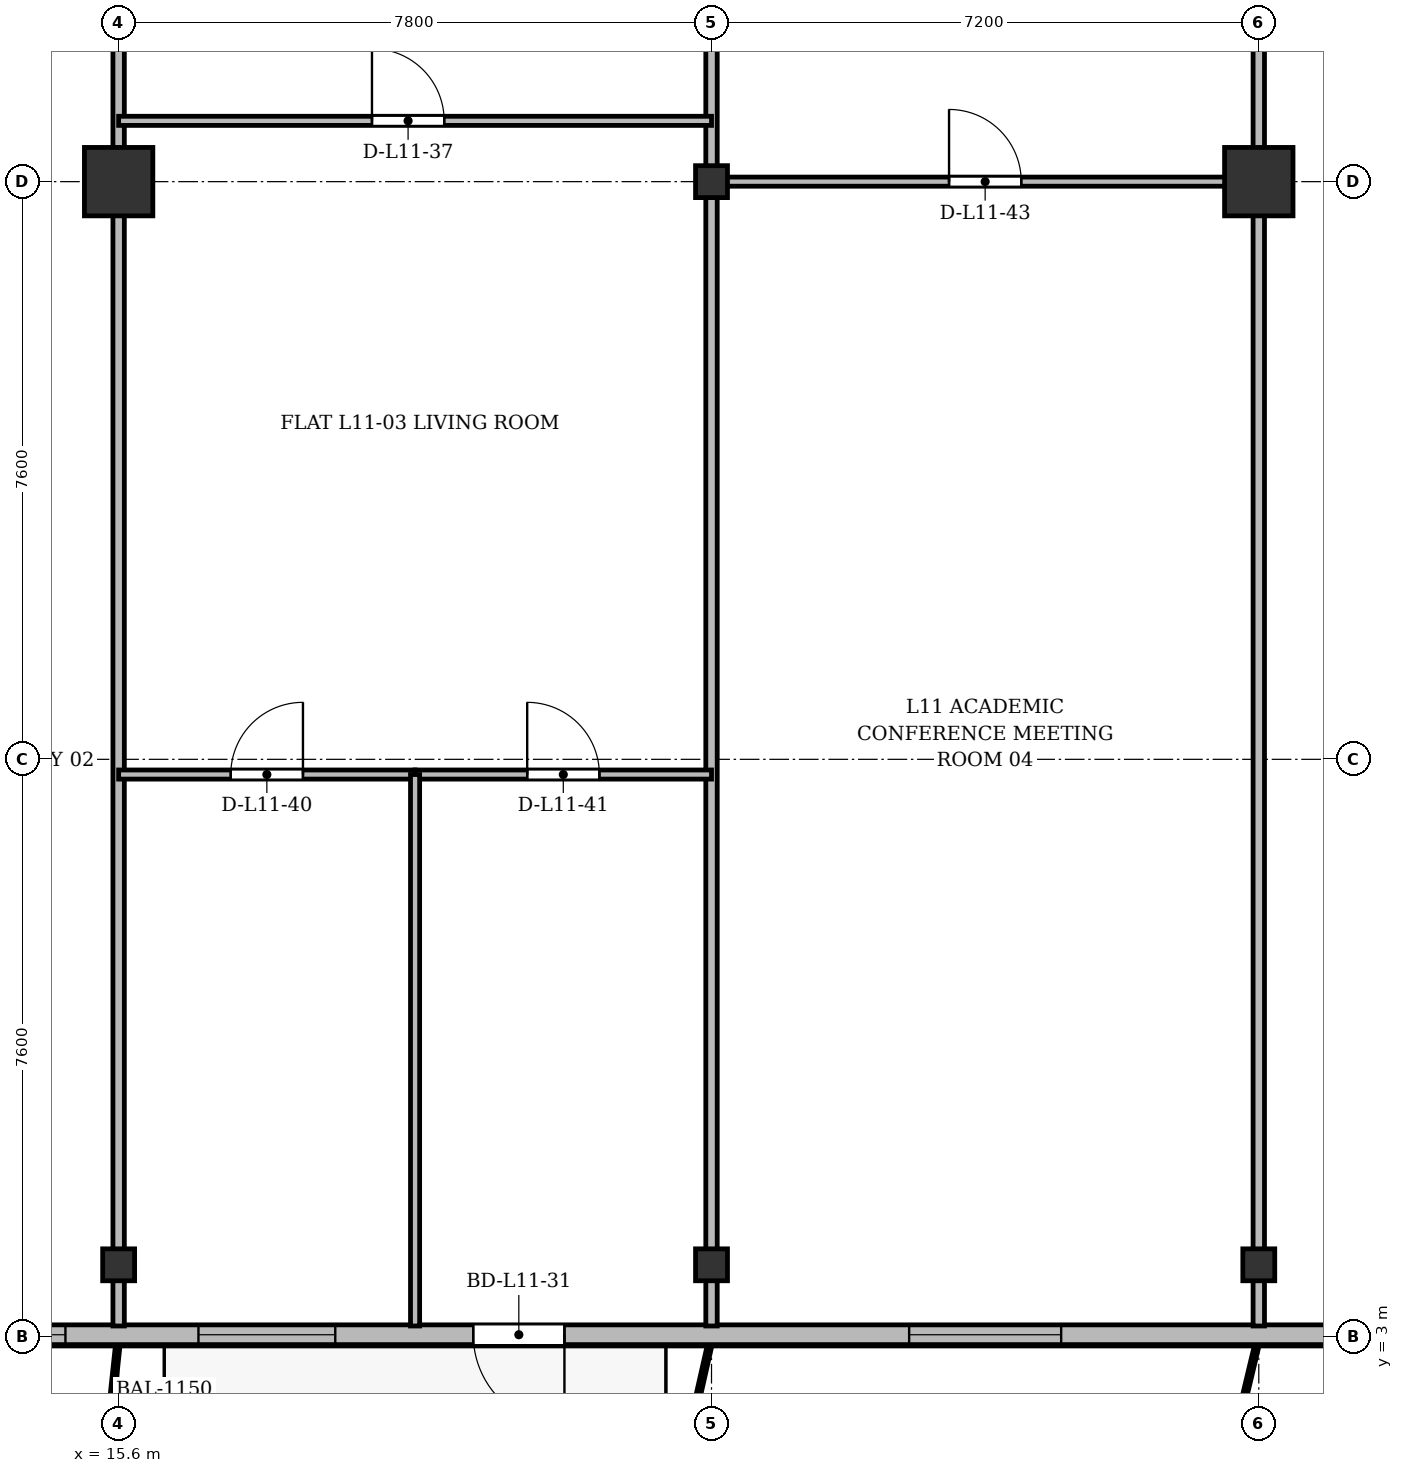
"""IFC4 building model, lengths in metres.
Left out: names, types, materials, properties, quantities, classifications, styles, units other than length and angle.
Written with IfcOpenShell. Run it as: python <this file> out.ifc"""

import sys

from ifc_helpers import new_model, si_unit, direction, frame, frame_2d, origin, origin_2d, place, context, subcontext, project, spatial, rectangle, i_section, extrude, source, transform, mapped, element, fill, save


model = new_model("IFC4")
c1 = context("Model", 3, precision=1e-05, world=origin(), true_north=direction((0.0, 1.0)))
c2 = subcontext(c1, "Body", "Model", "MODEL_VIEW")
j1 = project(units=[si_unit("LENGTHUNIT", "METRE"), si_unit("PLANEANGLEUNIT", "RADIAN")], contexts=[c1])
p1 = place(None, origin())
s1 = spatial("IfcSite", under=j1, at=p1, CompositionType="ELEMENT")
p2 = place(p1, origin())
s2 = spatial("IfcBuilding", under=s1, at=p2, CompositionType="ELEMENT")
p3 = place(p2, frame((0.0, 0.0, 45.1)))
s3 = spatial("IfcBuildingStorey", under=s2, at=p3, CompositionType="ELEMENT", Elevation=45.1)
m1 = source(origin(), c2, "Body", "SweptSolid", [
    extrude(i_section(OverallWidth=0.42, OverallDepth=0.42, WebThickness=0.026, FlangeThickness=0.04, at=origin_2d()), origin(), (0.0, 0.0, 1.0), 3.6),
])
p4 = place(p3, frame((15.6, 3.95, 0.0), z_axis=(0.0, 0.0, 1.0), x_axis=(1.0, 0.0, 0.0)))
e1 = element("IfcColumn", 1, at=p4, inside=s3, PredefinedType="COLUMN", context=c2, shape_type="MappedRepresentation", body=[
    mapped(m1, transform((0.0, 0.0, 0.0), x_axis=(1.0, 0.0, 0.0), y_axis=(0.0, 1.0, 0.0), z_axis=(0.0, 0.0, 1.0), scale=1.0)),
])
m2 = source(origin(), c2, "Body", "SweptSolid", [
    extrude(rectangle(XDim=0.9, YDim=0.9, at=origin_2d()), origin(), (0.0, 0.0, 1.0), 3.6),
])
p5 = place(p3, frame((15.6, 18.2, 0.0), z_axis=(0.0, 0.0, 1.0), x_axis=(1.0, 0.0, 0.0)))
e2 = element("IfcColumn", 2, at=p5, inside=s3, PredefinedType="COLUMN", context=c2, shape_type="MappedRepresentation", body=[
    mapped(m2, transform((0.0, 0.0, 0.0), x_axis=(1.0, 0.0, 0.0), y_axis=(0.0, 1.0, 0.0), z_axis=(0.0, 0.0, 1.0), scale=1.0)),
])
for number, where, z_axis, x_axis in (
    (3, (23.4, 3.95, 0.0), (0.0, 0.0, 1.0), (1.0, 0.0, 0.0)),
    (4, (23.4, 18.2, 0.0), (0.0, 0.0, 1.0), (1.0, 0.0, 0.0)),
    (5, (30.6, 3.95, 0.0), (0.0, 0.0, 1.0), (1.0, 0.0, 0.0)),
):
    element("IfcColumn", number, at=place(p3, frame(where, z_axis=z_axis, x_axis=x_axis)), inside=s3, PredefinedType="COLUMN", context=c2, shape_type="MappedRepresentation", body=[
        mapped(m1, transform((0.0, 0.0, 0.0), x_axis=(1.0, 0.0, 0.0), y_axis=(0.0, 1.0, 0.0), z_axis=(0.0, 0.0, 1.0), scale=1.0)),
    ])
p6 = place(p3, frame((30.6, 18.2, 0.0), z_axis=(0.0, 0.0, 1.0), x_axis=(1.0, 0.0, 0.0)))
e6 = element("IfcColumn", 6, at=p6, inside=s3, PredefinedType="COLUMN", context=c2, shape_type="MappedRepresentation", body=[
    mapped(m2, transform((0.0, 0.0, 0.0), x_axis=(1.0, 0.0, 0.0), y_axis=(0.0, 1.0, 0.0), z_axis=(0.0, 0.0, 1.0), scale=1.0)),
])
p7 = place(p3, frame((66.9, 3.03, 0.0), z_axis=(0.0, 0.0, 1.0), x_axis=(-1.0, 0.0, 0.0)))
e7 = element("IfcWall", 7, at=p7, inside=s3, PredefinedType="SOLIDWALL", context=c2, shape_type="SweptSolid", body=[
    extrude(rectangle(XDim=59.4, YDim=0.26, at=frame_2d((29.7, 0.0))), origin(), (0.0, 0.0, 1.0), 3.34),
])
p8 = place(p7, frame((0.395, 0.0, 0.9)))
e8 = element("IfcOpeningElement", 8, at=p8, cuts=e7, PredefinedType="OPENING", context=c2, shape_type="SweptSolid", body=[
    extrude(rectangle(XDim=2.2, YDim=1.8, at=frame_2d((1.1, 0.9))), frame((0.0, 0.14, 0.0), z_axis=(0.0, -1.0, 0.0), x_axis=(1.0, 0.0, 0.0)), (0.0, 0.0, 1.0), 0.28),
])
p9 = place(p7, frame((4.75, 0.0, 0.9)))
e9 = element("IfcOpeningElement", 9, at=p9, cuts=e7, PredefinedType="OPENING", context=c2, shape_type="SweptSolid", body=[
    extrude(rectangle(XDim=1.5, YDim=1.75, at=frame_2d((0.75, 0.875))), frame((0.0, 0.14, 0.0), z_axis=(0.0, -1.0, 0.0), x_axis=(1.0, 0.0, 0.0)), (0.0, 0.0, 1.0), 0.28),
])
p10 = place(p7, frame((11.0, 0.0, 0.9)))
e10 = element("IfcOpeningElement", 10, at=p10, cuts=e7, PredefinedType="OPENING", context=c2, shape_type="SweptSolid", body=[
    extrude(rectangle(XDim=2.0, YDim=1.95, at=frame_2d((1.0, 0.975))), frame((0.0, 0.14, 0.0), z_axis=(0.0, -1.0, 0.0), x_axis=(1.0, 0.0, 0.0)), (0.0, 0.0, 1.0), 0.28),
])
p11 = place(p7, frame((17.007, 0.0, 0.0)))
e11 = element("IfcOpeningElement", 11, at=p11, cuts=e7, PredefinedType="OPENING", context=c2, shape_type="SweptSolid", body=[
    extrude(rectangle(XDim=1.2, YDim=2.2, at=frame_2d((0.6, 1.1))), frame((0.0, 0.14, 0.0), z_axis=(0.0, -1.0, 0.0), x_axis=(1.0, 0.0, 0.0)), (0.0, 0.0, 1.0), 0.28),
])
p12 = place(p7, frame((20.4, 0.0, 0.9)))
e12 = element("IfcOpeningElement", 12, at=p12, cuts=e7, PredefinedType="OPENING", context=c2, shape_type="SweptSolid", body=[
    extrude(rectangle(XDim=1.8, YDim=1.8, at=frame_2d((0.9, 0.9))), frame((0.0, 0.14, 0.0), z_axis=(0.0, -1.0, 0.0), x_axis=(1.0, 0.0, 0.0)), (0.0, 0.0, 1.0), 0.28),
])
p13 = place(p7, frame((24.4, 0.0, 0.9)))
e13 = element("IfcOpeningElement", 13, at=p13, cuts=e7, PredefinedType="OPENING", context=c2, shape_type="SweptSolid", body=[
    extrude(rectangle(XDim=2.2, YDim=1.8, at=frame_2d((1.1, 0.9))), frame((0.0, 0.14, 0.0), z_axis=(0.0, -1.0, 0.0), x_axis=(1.0, 0.0, 0.0)), (0.0, 0.0, 1.0), 0.28),
])
p14 = place(p7, frame((31.35, 0.0, 0.9)))
e14 = element("IfcOpeningElement", 14, at=p14, cuts=e7, PredefinedType="OPENING", context=c2, shape_type="SweptSolid", body=[
    extrude(rectangle(XDim=1.5, YDim=1.75, at=frame_2d((0.75, 0.875))), frame((0.0, 0.14, 0.0), z_axis=(0.0, -1.0, 0.0), x_axis=(1.0, 0.0, 0.0)), (0.0, 0.0, 1.0), 0.28),
])
p15 = place(p7, frame((38.9, 0.0, 0.9)))
e15 = element("IfcOpeningElement", 15, at=p15, cuts=e7, PredefinedType="OPENING", context=c2, shape_type="SweptSolid", body=[
    extrude(rectangle(XDim=2.0, YDim=1.95, at=frame_2d((1.0, 0.975))), frame((0.0, 0.14, 0.0), z_axis=(0.0, -1.0, 0.0), x_axis=(1.0, 0.0, 0.0)), (0.0, 0.0, 1.0), 0.28),
])
p16 = place(p7, frame((45.435, 0.0, 0.0)))
e16 = element("IfcOpeningElement", 16, at=p16, cuts=e7, PredefinedType="OPENING", context=c2, shape_type="SweptSolid", body=[
    extrude(rectangle(XDim=1.2, YDim=2.2, at=frame_2d((0.6, 1.1))), frame((0.0, 0.14, 0.0), z_axis=(0.0, -1.0, 0.0), x_axis=(1.0, 0.0, 0.0)), (0.0, 0.0, 1.0), 0.28),
])
p17 = place(p7, frame((48.45, 0.0, 0.9)))
e17 = element("IfcOpeningElement", 17, at=p17, cuts=e7, PredefinedType="OPENING", context=c2, shape_type="SweptSolid", body=[
    extrude(rectangle(XDim=1.8, YDim=1.8, at=frame_2d((0.9, 0.9))), frame((0.0, 0.14, 0.0), z_axis=(0.0, -1.0, 0.0), x_axis=(1.0, 0.0, 0.0)), (0.0, 0.0, 1.0), 0.28),
])
p18 = place(p7, frame((52.0, 0.0, 0.9)))
e18 = element("IfcOpeningElement", 18, at=p18, cuts=e7, PredefinedType="OPENING", context=c2, shape_type="SweptSolid", body=[
    extrude(rectangle(XDim=2.2, YDim=1.8, at=frame_2d((1.1, 0.9))), frame((0.0, 0.14, 0.0), z_axis=(0.0, -1.0, 0.0), x_axis=(1.0, 0.0, 0.0)), (0.0, 0.0, 1.0), 0.28),
])
p19 = place(p7, frame((56.355, 0.0, 0.9)))
e19 = element("IfcOpeningElement", 19, at=p19, cuts=e7, PredefinedType="OPENING", context=c2, shape_type="SweptSolid", body=[
    extrude(rectangle(XDim=1.5, YDim=1.75, at=frame_2d((0.75, 0.875))), frame((0.0, 0.14, 0.0), z_axis=(0.0, -1.0, 0.0), x_axis=(1.0, 0.0, 0.0)), (0.0, 0.0, 1.0), 0.28),
])
for number, where, z_axis, x_axis in (
    (20, (15.6, 3.145, 0.0), (0.0, 0.0, 1.0), (0.0, 1.0, 0.0)),
    (21, (23.4, 3.145, 0.0), (0.0, 0.0, 1.0), (0.0, 1.0, 0.0)),
    (22, (30.6, 3.145, 0.0), (0.0, 0.0, 1.0), (0.0, 1.0, 0.0)),
):
    element("IfcWall", number, at=place(p3, frame(where, z_axis=z_axis, x_axis=x_axis)), inside=s3, PredefinedType="PARTITIONING", context=c2, shape_type="SweptSolid", body=[
        extrude(rectangle(XDim=24.455, YDim=0.15, at=frame_2d((12.228, 0.0))), origin(), (0.0, 0.0, 1.0), 2.752),
    ])
p20 = place(p3, frame((15.6, 19.0, 0.0), z_axis=(0.0, 0.0, 1.0), x_axis=(1.0, 0.0, 0.0)))
e23 = element("IfcWall", 23, at=p20, inside=s3, PredefinedType="PARTITIONING", context=c2, shape_type="SweptSolid", body=[
    extrude(rectangle(XDim=7.8, YDim=0.12, at=frame_2d((3.9, 0.0))), origin(), (0.0, 0.0, 1.0), 2.752),
])
p21 = place(p20, frame((3.333, 0.0, 0.0)))
e24 = element("IfcOpeningElement", 24, at=p21, cuts=e23, PredefinedType="OPENING", context=c2, shape_type="SweptSolid", body=[
    extrude(rectangle(XDim=0.95, YDim=2.15, at=frame_2d((0.475, 1.075))), frame((0.0, 0.07, 0.0), z_axis=(0.0, -1.0, 0.0), x_axis=(1.0, 0.0, 0.0)), (0.0, 0.0, 1.0), 0.14),
])
p22 = place(p3, frame((15.6, 10.4, 0.0), z_axis=(0.0, 0.0, 1.0), x_axis=(1.0, 0.0, 0.0)))
e25 = element("IfcWall", 25, at=p22, inside=s3, PredefinedType="PARTITIONING", context=c2, shape_type="SweptSolid", body=[
    extrude(rectangle(XDim=3.9, YDim=0.12, at=frame_2d((1.95, 0.0))), origin(), (0.0, 0.0, 1.0), 2.752),
])
p23 = place(p22, frame((1.475, 0.0, 0.0)))
e26 = element("IfcOpeningElement", 26, at=p23, cuts=e25, PredefinedType="OPENING", context=c2, shape_type="SweptSolid", body=[
    extrude(rectangle(XDim=0.95, YDim=2.15, at=frame_2d((0.475, 1.075))), frame((0.0, 0.07, 0.0), z_axis=(0.0, -1.0, 0.0), x_axis=(1.0, 0.0, 0.0)), (0.0, 0.0, 1.0), 0.14),
])
p24 = place(p3, frame((19.5, 10.4, 0.0), z_axis=(0.0, 0.0, 1.0), x_axis=(1.0, 0.0, 0.0)))
e27 = element("IfcWall", 27, at=p24, inside=s3, PredefinedType="PARTITIONING", context=c2, shape_type="SweptSolid", body=[
    extrude(rectangle(XDim=3.9, YDim=0.12, at=frame_2d((1.95, 0.0))), origin(), (0.0, 0.0, 1.0), 2.752),
])
p25 = place(p24, frame((1.475, 0.0, 0.0)))
e28 = element("IfcOpeningElement", 28, at=p25, cuts=e27, PredefinedType="OPENING", context=c2, shape_type="SweptSolid", body=[
    extrude(rectangle(XDim=0.95, YDim=2.15, at=frame_2d((0.475, 1.075))), frame((0.0, 0.07, 0.0), z_axis=(0.0, -1.0, 0.0), x_axis=(1.0, 0.0, 0.0)), (0.0, 0.0, 1.0), 0.14),
])
p26 = place(p3, frame((19.5, 3.145, 0.0), z_axis=(0.0, 0.0, 1.0), x_axis=(0.0, 1.0, 0.0)))
e29 = element("IfcWall", 29, at=p26, inside=s3, PredefinedType="PARTITIONING", context=c2, shape_type="SweptSolid", body=[
    extrude(rectangle(XDim=7.255, YDim=0.12, at=frame_2d((3.627, 0.0))), origin(), (0.0, 0.0, 1.0), 2.69),
])
p27 = place(p3, frame((23.4, 18.2, 0.0), z_axis=(0.0, 0.0, 1.0), x_axis=(1.0, 0.0, 0.0)))
e30 = element("IfcWall", 30, at=p27, inside=s3, PredefinedType="PARTITIONING", context=c2, shape_type="SweptSolid", body=[
    extrude(rectangle(XDim=7.2, YDim=0.12, at=frame_2d((3.6, 0.0))), origin(), (0.0, 0.0, 1.0), 2.69),
])
p28 = place(p27, frame((3.125, 0.0, 0.0)))
e31 = element("IfcOpeningElement", 31, at=p28, cuts=e30, PredefinedType="OPENING", context=c2, shape_type="SweptSolid", body=[
    extrude(rectangle(XDim=0.95, YDim=2.15, at=frame_2d((0.475, 1.075))), frame((0.0, 0.07, 0.0), z_axis=(0.0, -1.0, 0.0), x_axis=(1.0, 0.0, 0.0)), (0.0, 0.0, 1.0), 0.14),
])
m3 = source(origin(), c2, "Body", "SweptSolid", [
    extrude(rectangle(XDim=2.0, YDim=1.95, at=frame_2d((1.0, 0.975))), frame((0.0, 0.03, 0.0), z_axis=(0.0, -1.0, 0.0), x_axis=(1.0, 0.0, 0.0)), (0.0, 0.0, 1.0), 0.06),
])
p29 = place(p15, origin())
e32 = element("IfcWindow", 32, at=p29, inside=s3, PartitioningType="SINGLE_PANEL", PredefinedType="WINDOW", context=c2, shape_type="MappedRepresentation", body=[
    mapped(m3, transform((0.0, 0.0, 0.0), x_axis=(1.0, 0.0, 0.0), y_axis=(0.0, 1.0, 0.0), z_axis=(0.0, 0.0, 1.0), scale=1.0)),
])
fill(e15, e32)
m4 = source(origin(), c2, "Body", "SweptSolid", [
    extrude(rectangle(XDim=1.2, YDim=2.2, at=frame_2d((0.6, 1.1))), frame((0.0, 0.025, 0.0), z_axis=(0.0, -1.0, 0.0), x_axis=(1.0, 0.0, 0.0)), (0.0, 0.0, 1.0), 0.05),
])
p30 = place(p16, origin())
e33 = element("IfcDoor", 33, at=p30, inside=s3, OperationType="SINGLE_SWING_LEFT", PredefinedType="DOOR", context=c2, shape_type="MappedRepresentation", body=[
    mapped(m4, transform((0.0, 0.0, 0.0), x_axis=(1.0, 0.0, 0.0), y_axis=(0.0, 1.0, 0.0), z_axis=(0.0, 0.0, 1.0), scale=1.0)),
])
fill(e16, e33)
m5 = source(origin(), c2, "Body", "SweptSolid", [
    extrude(rectangle(XDim=1.8, YDim=1.8, at=frame_2d((0.9, 0.9))), frame((0.0, 0.03, 0.0), z_axis=(0.0, -1.0, 0.0), x_axis=(1.0, 0.0, 0.0)), (0.0, 0.0, 1.0), 0.06),
])
p31 = place(p17, origin())
e34 = element("IfcWindow", 34, at=p31, inside=s3, PartitioningType="SINGLE_PANEL", PredefinedType="WINDOW", context=c2, shape_type="MappedRepresentation", body=[
    mapped(m5, transform((0.0, 0.0, 0.0), x_axis=(1.0, 0.0, 0.0), y_axis=(0.0, 1.0, 0.0), z_axis=(0.0, 0.0, 1.0), scale=1.0)),
])
fill(e17, e34)
m6 = source(origin(), c2, "Body", "SweptSolid", [
    extrude(rectangle(XDim=2.2, YDim=1.8, at=frame_2d((1.1, 0.9))), frame((0.0, 0.03, 0.0), z_axis=(0.0, -1.0, 0.0), x_axis=(1.0, 0.0, 0.0)), (0.0, 0.0, 1.0), 0.06),
])
p32 = place(p18, origin())
e35 = element("IfcWindow", 35, at=p32, inside=s3, PartitioningType="SINGLE_PANEL", PredefinedType="WINDOW", context=c2, shape_type="MappedRepresentation", body=[
    mapped(m6, transform((0.0, 0.0, 0.0), x_axis=(1.0, 0.0, 0.0), y_axis=(0.0, 1.0, 0.0), z_axis=(0.0, 0.0, 1.0), scale=1.0)),
])
fill(e18, e35)
m7 = source(origin(), c2, "Body", "SweptSolid", [
    extrude(rectangle(XDim=0.95, YDim=2.15, at=frame_2d((0.475, 1.075))), frame((0.0, 0.025, 0.0), z_axis=(0.0, -1.0, 0.0), x_axis=(1.0, 0.0, 0.0)), (0.0, 0.0, 1.0), 0.05),
])
p33 = place(p21, origin())
e36 = element("IfcDoor", 36, at=p33, inside=s3, OperationType="SINGLE_SWING_LEFT", PredefinedType="DOOR", context=c2, shape_type="MappedRepresentation", body=[
    mapped(m7, transform((0.0, 0.0, 0.0), x_axis=(1.0, 0.0, 0.0), y_axis=(0.0, 1.0, 0.0), z_axis=(0.0, 0.0, 1.0), scale=1.0)),
])
fill(e24, e36)
p34 = place(p23, origin())
e37 = element("IfcDoor", 37, at=p34, inside=s3, OperationType="SINGLE_SWING_RIGHT", PredefinedType="DOOR", context=c2, shape_type="MappedRepresentation", body=[
    mapped(m7, transform((0.0, 0.0, 0.0), x_axis=(1.0, 0.0, 0.0), y_axis=(0.0, 1.0, 0.0), z_axis=(0.0, 0.0, 1.0), scale=1.0)),
])
fill(e26, e37)
p35 = place(p25, origin())
e38 = element("IfcDoor", 38, at=p35, inside=s3, OperationType="SINGLE_SWING_LEFT", PredefinedType="DOOR", context=c2, shape_type="MappedRepresentation", body=[
    mapped(m7, transform((0.0, 0.0, 0.0), x_axis=(1.0, 0.0, 0.0), y_axis=(0.0, 1.0, 0.0), z_axis=(0.0, 0.0, 1.0), scale=1.0)),
])
fill(e28, e38)
p36 = place(p28, origin())
e39 = element("IfcDoor", 39, at=p36, inside=s3, OperationType="SINGLE_SWING_LEFT", PredefinedType="DOOR", context=c2, shape_type="MappedRepresentation", body=[
    mapped(m7, transform((0.0, 0.0, 0.0), x_axis=(1.0, 0.0, 0.0), y_axis=(0.0, 1.0, 0.0), z_axis=(0.0, 0.0, 1.0), scale=1.0)),
])
fill(e31, e39)
save(model, sys.argv[1])
